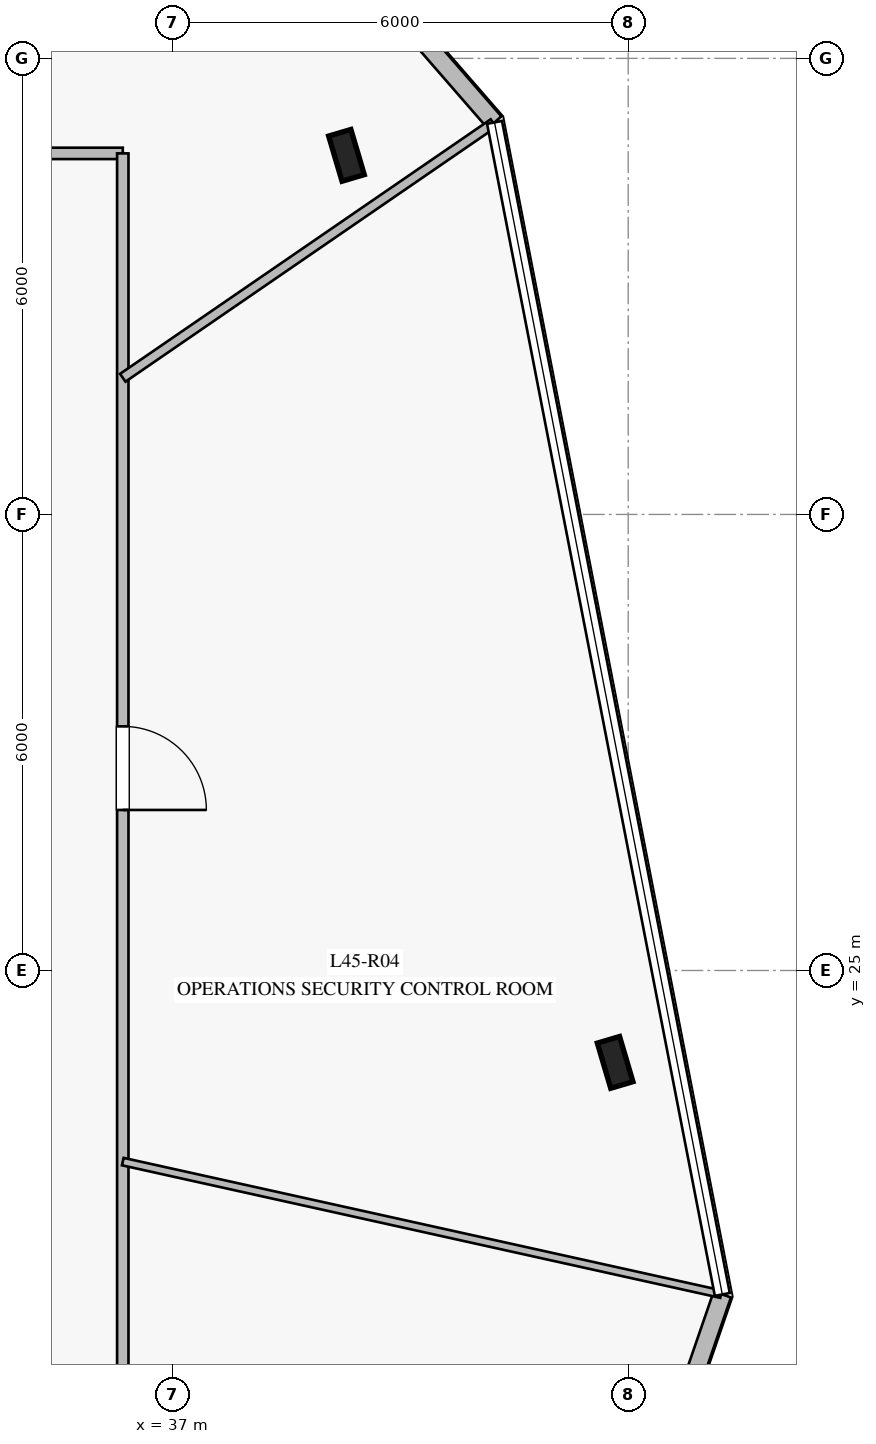
"""IFC4 building model, lengths in metres.
Left out: names, types, materials, properties, quantities, classifications, styles, units other than length and angle.
Written with IfcOpenShell. Run it as: python <this file> out.ifc"""

import sys

from ifc_helpers import new_model, si_unit, direction, frame, frame_2d, origin, origin_2d, place, context, subcontext, project, spatial, rectangle, i_section, extrude, element, fill, save


model = new_model("IFC4")
c1 = context("Model", 3, precision=1e-05, world=origin(), true_north=direction((0.0, 1.0)))
c2 = subcontext(c1, "Body", "Model", "MODEL_VIEW")
j1 = project(units=[si_unit("LENGTHUNIT", "METRE"), si_unit("PLANEANGLEUNIT", "RADIAN")], contexts=[c1])
p1 = place(None, origin())
s1 = spatial("IfcSite", under=j1, at=p1, CompositionType="ELEMENT")
p2 = place(p1, origin())
s2 = spatial("IfcBuilding", under=s1, at=p2, CompositionType="ELEMENT")
p3 = place(p2, frame((0.0, 0.0, 188.8)))
s3 = spatial("IfcBuildingStorey", under=s2, at=p3, CompositionType="ELEMENT", Elevation=188.8)
for number, where, z_axis, x_axis in (
    (1, (42.828, 23.791, 0.0), (0.0, 0.0, 1.0), (-0.284, 0.959, 0.0)),
    (2, (39.293, 35.724, 0.0), (0.0, 0.0, 1.0), (-0.284, 0.959, 0.0)),
):
    element("IfcColumn", number, at=place(p3, frame(where, z_axis=z_axis, x_axis=x_axis)), inside=s3, PredefinedType="COLUMN", context=c2, shape_type="SweptSolid", body=[
        extrude(i_section(OverallWidth=0.305, OverallDepth=0.62, WebThickness=0.021, FlangeThickness=0.04, at=origin_2d()), origin(), (0.0, 0.0, 1.0), 4.0),
    ])
p4 = place(p3, frame((42.784, 16.514, 0.0), z_axis=(0.0, 0.0, 1.0), x_axis=(0.325492114227, 0.94554475493, 0.0)))
e3 = element("IfcWall", 3, at=p4, inside=s3, PredefinedType="STANDARD", context=c2, shape_type="SweptSolid", body=[
    extrude(rectangle(XDim=4.467, YDim=0.24, at=frame_2d((2.234, 0.0))), origin(), (0.0, 0.0, 1.0), 3.78),
])
p5 = place(p3, frame((41.241, 36.158, 0.0), z_axis=(0.0, 0.0, 1.0), x_axis=(-0.656134075049, 0.754644337128, 0.0)))
e4 = element("IfcWall", 4, at=p5, inside=s3, PredefinedType="STANDARD", context=c2, shape_type="SweptSolid", body=[
    extrude(rectangle(XDim=4.469, YDim=0.24, at=frame_2d((2.234, 0.0))), origin(), (0.0, 0.0, 1.0), 3.78),
])
p6 = place(p3, frame((13.65, 35.75, 0.0), z_axis=(0.0, 0.0, 1.0), x_axis=(1.0, 0.0, 0.0)))
e5 = element("IfcWall", 5, at=p6, inside=s3, PredefinedType="PARTITIONING", context=c2, shape_type="SweptSolid", body=[
    extrude(rectangle(XDim=22.7, YDim=0.15, at=frame_2d((11.35, 0.0))), origin(), (0.0, 0.0, 1.0), 3.05),
])
p7 = place(p6, frame((18.244, 0.0, 0.0)))
e6 = element("IfcOpeningElement", 6, at=p7, cuts=e5, PredefinedType="OPENING", context=c2, shape_type="SweptSolid", body=[
    extrude(rectangle(XDim=1.1, YDim=2.2, at=frame_2d((0.55, 1.1))), frame((0.0, 0.085, 0.0), z_axis=(0.0, -1.0, 0.0), x_axis=(1.0, 0.0, 0.0)), (0.0, 0.0, 1.0), 0.17),
])
p8 = place(p6, frame((9.18, 0.0, 0.0)))
e7 = element("IfcOpeningElement", 7, at=p8, cuts=e5, PredefinedType="OPENING", context=c2, shape_type="SweptSolid", body=[
    extrude(rectangle(XDim=1.1, YDim=2.2, at=frame_2d((0.55, 1.1))), frame((0.0, 0.085, 0.0), z_axis=(0.0, -1.0, 0.0), x_axis=(1.0, 0.0, 0.0)), (0.0, 0.0, 1.0), 0.17),
])
p9 = place(p6, frame((1.913, 0.0, 0.0)))
e8 = element("IfcOpeningElement", 8, at=p9, cuts=e5, PredefinedType="OPENING", context=c2, shape_type="SweptSolid", body=[
    extrude(rectangle(XDim=1.1, YDim=2.2, at=frame_2d((0.55, 1.1))), frame((0.0, 0.085, 0.0), z_axis=(0.0, -1.0, 0.0), x_axis=(1.0, 0.0, 0.0)), (0.0, 0.0, 1.0), 0.17),
])
p10 = place(p3, frame((36.35, 35.75, 0.0), z_axis=(0.0, 0.0, 1.0), x_axis=(0.0, -1.0, 0.0)))
e9 = element("IfcWall", 9, at=p10, inside=s3, PredefinedType="PARTITIONING", context=c2, shape_type="SweptSolid", body=[
    extrude(rectangle(XDim=21.5, YDim=0.15, at=frame_2d((10.75, 0.0))), origin(), (0.0, 0.0, 1.0), 3.02),
])
p11 = place(p10, frame((16.657, 0.0, 0.0)))
e10 = element("IfcOpeningElement", 10, at=p11, cuts=e9, PredefinedType="OPENING", context=c2, shape_type="SweptSolid", body=[
    extrude(rectangle(XDim=1.1, YDim=2.2, at=frame_2d((0.55, 1.1))), frame((0.0, 0.085, 0.0), z_axis=(0.0, -1.0, 0.0), x_axis=(1.0, 0.0, 0.0)), (0.0, 0.0, 1.0), 0.17),
])
p12 = place(p10, frame((7.538, 0.0, 0.0)))
e11 = element("IfcOpeningElement", 11, at=p12, cuts=e9, PredefinedType="OPENING", context=c2, shape_type="SweptSolid", body=[
    extrude(rectangle(XDim=1.1, YDim=2.2, at=frame_2d((0.55, 1.1))), frame((0.0, 0.085, 0.0), z_axis=(0.0, -1.0, 0.0), x_axis=(1.0, 0.0, 0.0)), (0.0, 0.0, 1.0), 0.17),
])
p13 = place(p3, frame((36.35, 22.486, 0.0), z_axis=(0.0, 0.0, 1.0), x_axis=(0.976316571285, -0.216346834122, 0.0)))
e12 = element("IfcWall", 12, at=p13, inside=s3, PredefinedType="MOVABLE", context=c2, shape_type="SweptSolid", body=[
    extrude(rectangle(XDim=8.062, YDim=0.1, at=frame_2d((4.031, 0.0))), origin(), (0.0, 0.0, 1.0), 3.18),
])
p14 = place(p3, frame((36.35, 32.798, 0.0), z_axis=(0.0, 0.0, 1.0), x_axis=(0.824306770306, 0.566143399173, 0.0)))
e13 = element("IfcWall", 13, at=p14, inside=s3, PredefinedType="PARTITIONING", context=c2, shape_type="SweptSolid", body=[
    extrude(rectangle(XDim=5.915, YDim=0.125, at=frame_2d((2.958, 0.0))), origin(), (0.0, 0.0, 1.0), 3.18),
])
p15 = place(p12, origin())
e14 = element("IfcDoor", 14, at=p15, inside=s3, OperationType="SINGLE_SWING_RIGHT", PredefinedType="DOOR", context=c2, shape_type="SweptSolid", body=[
    extrude(rectangle(XDim=1.1, YDim=2.2, at=frame_2d((0.55, 1.1))), frame((0.0, 0.025, 0.0), z_axis=(0.0, -1.0, 0.0), x_axis=(1.0, 0.0, 0.0)), (0.0, 0.0, 1.0), 0.05),
])
fill(e11, e14)
save(model, sys.argv[1])
